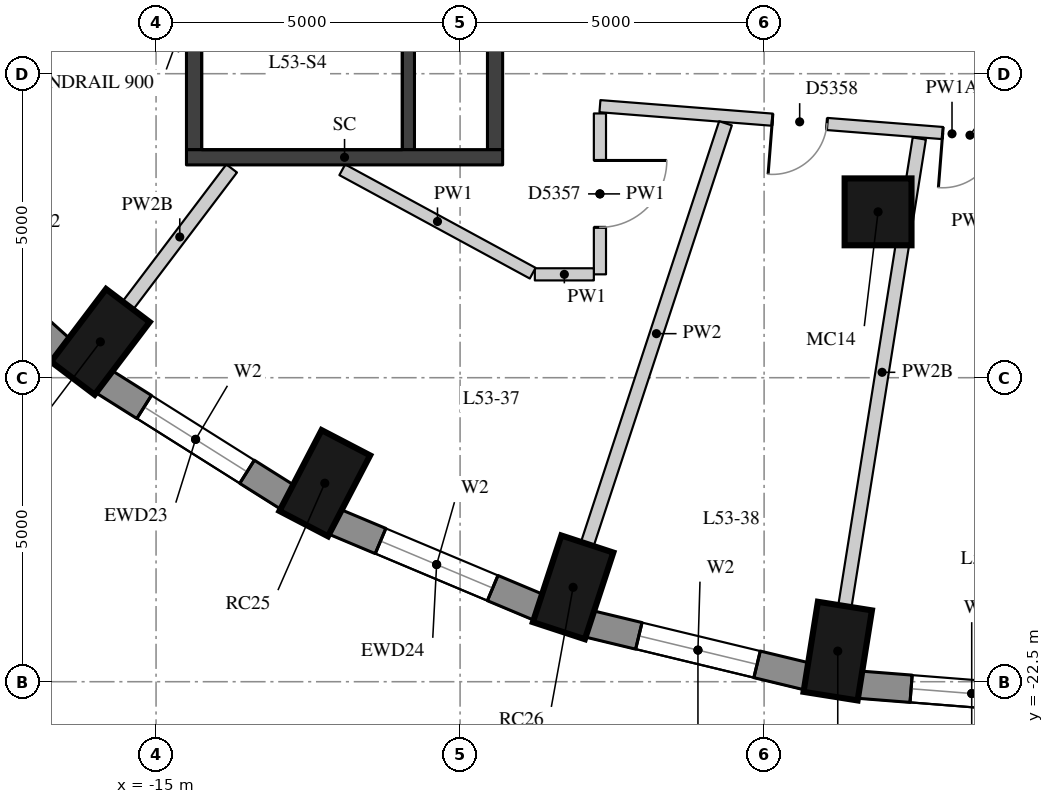
"""IFC4 building model, lengths in metres.
Left out: names, types, materials, properties, quantities, classifications, styles, units other than length and angle.
Written with IfcOpenShell. Run it as: python <this file> out.ifc"""

import sys

from ifc_helpers import new_model, si_unit, direction, frame, frame_2d, origin, origin_2d, place, context, subcontext, project, spatial, rectangle, extrude, element, fill, save


model = new_model("IFC4")
c1 = context("Model", 3, precision=1e-05, world=origin(), true_north=direction((0.0, 1.0)))
c2 = subcontext(c1, "Body", "Model", "MODEL_VIEW")
j1 = project(units=[si_unit("LENGTHUNIT", "METRE"), si_unit("PLANEANGLEUNIT", "RADIAN")], contexts=[c1])
p1 = place(None, origin())
s1 = spatial("IfcSite", under=j1, at=p1, CompositionType="ELEMENT")
p2 = place(p1, origin())
s2 = spatial("IfcBuilding", under=s1, at=p2, CompositionType="ELEMENT")
p3 = place(p2, frame((0.0, 0.0, 189.2)))
s3 = spatial("IfcBuildingStorey", under=s2, at=p3, CompositionType="ELEMENT", Elevation=189.2)
for number, where, z_axis, x_axis in (
    (1, (-15.916, -16.911, 0.0), (0.0, 0.0, 1.0), (-0.604, -0.797, 0.0)),
    (2, (-12.225, -19.235, 0.0), (0.0, 0.0, 1.0), (-0.462, -0.887, 0.0)),
    (3, (-8.141, -20.948, 0.0), (0.0, 0.0, 1.0), (-0.312, -0.95, 0.0)),
    (4, (-3.789, -21.997, 0.0), (0.0, 0.0, 1.0), (-0.157, -0.988, 0.0)),
):
    element("IfcColumn", number, at=place(p3, frame(where, z_axis=z_axis, x_axis=x_axis)), inside=s3, PredefinedType="COLUMN", context=c2, shape_type="SweptSolid", body=[
        extrude(rectangle(XDim=1.5, YDim=0.9, at=origin_2d()), origin(), (0.0, 0.0, 1.0), 3.3),
    ])
p4 = place(p3, frame((-3.126, -14.772, 0.0), z_axis=(0.0, 0.0, 1.0), x_axis=(1.0, 0.0, 0.0)))
e5 = element("IfcColumn", 5, at=p4, inside=s3, PredefinedType="COLUMN", context=c2, shape_type="SweptSolid", body=[
    extrude(rectangle(XDim=1.1, YDim=1.1, at=origin_2d()), origin(), (0.0, 0.0, 1.0), 3.3),
])
p5 = place(p3, frame((-19.165, -14.69, 0.0), z_axis=(0.0, 0.0, 1.0), x_axis=(0.743442727602, -0.668799604348, 0.0)))
e6 = element("IfcWall", 6, at=p5, inside=s3, PredefinedType="SOLIDWALL", context=c2, shape_type="SweptSolid", body=[
    extrude(rectangle(XDim=3.513, YDim=0.45, at=frame_2d((1.756, 0.0))), origin(), (0.0, 0.0, 1.0), 3.02),
])
p6 = place(p5, frame((0.756, 0.0, 0.4)))
e7 = element("IfcOpeningElement", 7, at=p6, cuts=e6, PredefinedType="OPENING", context=c2, shape_type="SweptSolid", body=[
    extrude(rectangle(XDim=2.0, YDim=1.75, at=frame_2d((1.0, 0.875))), frame((0.0, 0.235, 0.0), z_axis=(0.0, -1.0, 0.0), x_axis=(1.0, 0.0, 0.0)), (0.0, 0.0, 1.0), 0.47),
])
p7 = place(p3, frame((-15.867, -17.559, 0.0), z_axis=(0.0, 0.0, 1.0), x_axis=(0.84616917791, -0.532914366813, 0.0)))
e8 = element("IfcWall", 8, at=p7, inside=s3, PredefinedType="SOLIDWALL", context=c2, shape_type="SweptSolid", body=[
    extrude(rectangle(XDim=3.587, YDim=0.45, at=frame_2d((1.793, 0.0))), origin(), (0.0, 0.0, 1.0), 3.02),
])
p8 = place(p7, frame((0.793, 0.0, 0.4)))
e9 = element("IfcOpeningElement", 9, at=p8, cuts=e8, PredefinedType="OPENING", context=c2, shape_type="SweptSolid", body=[
    extrude(rectangle(XDim=2.0, YDim=1.75, at=frame_2d((1.0, 0.875))), frame((0.0, 0.235, 0.0), z_axis=(0.0, -1.0, 0.0), x_axis=(1.0, 0.0, 0.0)), (0.0, 0.0, 1.0), 0.47),
])
p9 = place(p3, frame((-12.069, -19.867, 0.0), z_axis=(0.0, 0.0, 1.0), x_axis=(0.922168222612, -0.386789050006, 0.0)))
e10 = element("IfcWall", 10, at=p9, inside=s3, PredefinedType="SOLIDWALL", context=c2, shape_type="SweptSolid", body=[
    extrude(rectangle(XDim=3.651, YDim=0.45, at=frame_2d((1.825, 0.0))), origin(), (0.0, 0.0, 1.0), 3.02),
])
p10 = place(p9, frame((0.825, 0.0, 0.4)))
e11 = element("IfcOpeningElement", 11, at=p10, cuts=e10, PredefinedType="OPENING", context=c2, shape_type="SweptSolid", body=[
    extrude(rectangle(XDim=2.0, YDim=1.75, at=frame_2d((1.0, 0.875))), frame((0.0, 0.235, 0.0), z_axis=(0.0, -1.0, 0.0), x_axis=(1.0, 0.0, 0.0)), (0.0, 0.0, 1.0), 0.47),
])
p11 = place(p3, frame((-7.885, -21.547, 0.0), z_axis=(0.0, 0.0, 1.0), x_axis=(0.9721584944, -0.234324266275, 0.0)))
e12 = element("IfcWall", 12, at=p11, inside=s3, PredefinedType="SOLIDWALL", context=c2, shape_type="SweptSolid", body=[
    extrude(rectangle(XDim=3.698, YDim=0.45, at=frame_2d((1.849, 0.0))), origin(), (0.0, 0.0, 1.0), 3.02),
])
p12 = place(p11, frame((0.849, 0.0, 0.4)))
e13 = element("IfcOpeningElement", 13, at=p12, cuts=e12, PredefinedType="OPENING", context=c2, shape_type="SweptSolid", body=[
    extrude(rectangle(XDim=2.0, YDim=1.75, at=frame_2d((1.0, 0.875))), frame((0.0, 0.235, 0.0), z_axis=(0.0, -1.0, 0.0), x_axis=(1.0, 0.0, 0.0)), (0.0, 0.0, 1.0), 0.47),
])
p13 = place(p3, frame((-3.441, -22.548, 0.0), z_axis=(0.0, 0.0, 1.0), x_axis=(0.996913971077, -0.078501810629, 0.0)))
e14 = element("IfcWall", 14, at=p13, inside=s3, PredefinedType="SOLIDWALL", context=c2, shape_type="SweptSolid", body=[
    extrude(rectangle(XDim=3.723, YDim=0.45, at=frame_2d((1.861, 0.0))), origin(), (0.0, 0.0, 1.0), 3.02),
])
p14 = place(p13, frame((0.861, 0.0, 0.4)))
e15 = element("IfcOpeningElement", 15, at=p14, cuts=e14, PredefinedType="OPENING", context=c2, shape_type="SweptSolid", body=[
    extrude(rectangle(XDim=2.0, YDim=1.75, at=frame_2d((1.0, 0.875))), frame((0.0, 0.235, 0.0), z_axis=(0.0, -1.0, 0.0), x_axis=(1.0, 0.0, 0.0)), (0.0, 0.0, 1.0), 0.47),
])
p15 = place(p3, frame((-10.85, -13.75, 0.0), z_axis=(0.0, 0.0, 1.0), x_axis=(0.0, 1.0, 0.0)))
e16 = element("IfcWall", 16, at=p15, inside=s3, PredefinedType="SHEAR", context=c2, shape_type="SweptSolid", body=[
    extrude(rectangle(XDim=6.0, YDim=0.2, at=frame_2d((3.0, 0.0))), origin(), (0.0, 0.0, 1.0), 3.02),
])
p16 = place(p15, frame((4.4, 0.0, 0.0)))
e17 = element("IfcOpeningElement", 17, at=p16, cuts=e16, PredefinedType="OPENING", context=c2, shape_type="SweptSolid", body=[
    extrude(rectangle(XDim=1.5, YDim=2.1, at=frame_2d((0.75, 1.05))), frame((0.0, 0.11, 0.0), z_axis=(0.0, -1.0, 0.0), x_axis=(1.0, 0.0, 0.0)), (0.0, 0.0, 1.0), 0.22),
])
p17 = place(p3, frame((-14.375, -13.75, -0.28), z_axis=(0.0, 0.0, 1.0), x_axis=(0.0, 1.0, 0.0)))
e18 = element("IfcWall", 18, at=p17, inside=s3, PredefinedType="SHEAR", context=c2, shape_type="SweptSolid", body=[
    extrude(rectangle(XDim=6.0, YDim=0.25, at=frame_2d((3.0, 0.0))), origin(), (0.0, 0.0, 1.0), 3.3),
])
p18 = place(p3, frame((-9.425, -13.75, -0.28), z_axis=(0.0, 0.0, 1.0), x_axis=(0.0, 1.0, 0.0)))
e19 = element("IfcWall", 19, at=p18, inside=s3, PredefinedType="SHEAR", context=c2, shape_type="SweptSolid", body=[
    extrude(rectangle(XDim=6.0, YDim=0.25, at=frame_2d((3.0, 0.0))), origin(), (0.0, 0.0, 1.0), 3.3),
])
p19 = place(p18, frame((2.4, 0.0, 0.28)))
e20 = element("IfcOpeningElement", 20, at=p19, cuts=e19, PredefinedType="OPENING", context=c2, shape_type="SweptSolid", body=[
    extrude(rectangle(XDim=1.5, YDim=2.1, at=frame_2d((0.75, 1.05))), frame((0.0, 0.135, 0.0), z_axis=(0.0, -1.0, 0.0), x_axis=(1.0, 0.0, 0.0)), (0.0, 0.0, 1.0), 0.27),
])
p20 = place(p3, frame((-14.5, -13.875, -0.28), z_axis=(0.0, 0.0, 1.0), x_axis=(1.0, 0.0, 0.0)))
e21 = element("IfcWall", 21, at=p20, inside=s3, PredefinedType="SHEAR", context=c2, shape_type="SweptSolid", body=[
    extrude(rectangle(XDim=5.2, YDim=0.25, at=frame_2d((2.6, 0.0))), origin(), (0.0, 0.0, 1.0), 3.3),
])
p21 = place(p3, frame((3.881, -13.943, 0.0), z_axis=(0.0, 0.0, 1.0), x_axis=(-0.996932335491, 0.078268246772, 0.0)))
e22 = element("IfcWall", 22, at=p21, inside=s3, PredefinedType="PARTITIONING", context=c2, shape_type="SweptSolid", body=[
    extrude(rectangle(XDim=11.616, YDim=0.2, at=frame_2d((5.808, 0.0))), origin(), (0.0, 0.0, 1.0), 2.57),
])
p22 = place(p21, frame((7.871, 0.0, 0.0)))
e23 = element("IfcOpeningElement", 23, at=p22, cuts=e22, PredefinedType="OPENING", context=c2, shape_type="SweptSolid", body=[
    extrude(rectangle(XDim=0.9, YDim=2.1, at=frame_2d((0.45, 1.05))), frame((0.0, 0.11, 0.0), z_axis=(0.0, -1.0, 0.0), x_axis=(1.0, 0.0, 0.0)), (0.0, 0.0, 1.0), 0.22),
])
p23 = place(p21, frame((5.062, 0.0, 0.0)))
e24 = element("IfcOpeningElement", 24, at=p23, cuts=e22, PredefinedType="OPENING", context=c2, shape_type="SweptSolid", body=[
    extrude(rectangle(XDim=0.9, YDim=2.1, at=frame_2d((0.45, 1.05))), frame((0.0, 0.11, 0.0), z_axis=(0.0, -1.0, 0.0), x_axis=(1.0, 0.0, 0.0)), (0.0, 0.0, 1.0), 0.22),
])
p24 = place(p21, frame((1.554, 0.0, 0.0)))
e25 = element("IfcOpeningElement", 25, at=p24, cuts=e22, PredefinedType="OPENING", context=c2, shape_type="SweptSolid", body=[
    extrude(rectangle(XDim=0.9, YDim=2.1, at=frame_2d((0.45, 1.05))), frame((0.0, 0.11, 0.0), z_axis=(0.0, -1.0, 0.0), x_axis=(1.0, 0.0, 0.0)), (0.0, 0.0, 1.0), 0.22),
])
p25 = place(p3, frame((-7.7, -13.154, 0.0), z_axis=(0.0, 0.0, 1.0), x_axis=(0.0, -1.0, 0.0)))
e26 = element("IfcWall", 26, at=p25, inside=s3, PredefinedType="PARTITIONING", context=c2, shape_type="SweptSolid", body=[
    extrude(rectangle(XDim=2.646, YDim=0.2, at=frame_2d((1.323, 0.0))), origin(), (0.0, 0.0, 1.0), 3.02),
])
p26 = place(p25, frame((0.773, 0.0, 0.0)))
e27 = element("IfcOpeningElement", 27, at=p26, cuts=e26, PredefinedType="OPENING", context=c2, shape_type="SweptSolid", body=[
    extrude(rectangle(XDim=1.1, YDim=2.1, at=frame_2d((0.55, 1.05))), frame((0.0, 0.11, 0.0), z_axis=(0.0, -1.0, 0.0), x_axis=(1.0, 0.0, 0.0)), (0.0, 0.0, 1.0), 0.22),
])
p27 = place(p3, frame((-7.8, -15.8, 0.0), z_axis=(0.0, 0.0, 1.0), x_axis=(-1.0, 0.0, 0.0)))
e28 = element("IfcWall", 28, at=p27, inside=s3, PredefinedType="PARTITIONING", context=c2, shape_type="SweptSolid", body=[
    extrude(rectangle(XDim=0.97, YDim=0.2, at=frame_2d((0.485, 0.0))), origin(), (0.0, 0.0, 1.0), 3.02),
])
p28 = place(p3, frame((-8.806, -15.781, 0.0), z_axis=(0.0, 0.0, 1.0), x_axis=(-0.878760680736, 0.477262680284, 0.0)))
e29 = element("IfcWall", 29, at=p28, inside=s3, PredefinedType="PARTITIONING", context=c2, shape_type="SweptSolid", body=[
    extrude(rectangle(XDim=3.564, YDim=0.2, at=frame_2d((1.782, 0.0))), origin(), (0.0, 0.0, 1.0), 3.02),
])
p29 = place(p3, frame((-15.463, -16.312, 0.0), z_axis=(0.0, 0.0, 1.0), x_axis=(0.603613294085, 0.797277236101, 0.0)))
e30 = element("IfcWall", 30, at=p29, inside=s3, PredefinedType="PARTITIONING", context=c2, shape_type="SweptSolid", body=[
    extrude(rectangle(XDim=2.828, YDim=0.22, at=frame_2d((1.414, 0.0))), origin(), (0.0, 0.0, 1.0), 2.57),
])
p30 = place(p3, frame((-7.907, -20.235, 0.0), z_axis=(0.0, 0.0, 1.0), x_axis=(0.311980831408, 0.950088396326, 0.0)))
e31 = element("IfcWall", 31, at=p30, inside=s3, PredefinedType="PARTITIONING", context=c2, shape_type="SweptSolid", body=[
    extrude(rectangle(XDim=7.283, YDim=0.22, at=frame_2d((3.642, 0.0))), origin(), (0.0, 0.0, 1.0), 3.02),
])
p31 = place(p3, frame((-3.671, -21.256, 0.0), z_axis=(0.0, 0.0, 1.0), x_axis=(0.157083078724, 0.987585391943, 0.0)))
e32 = element("IfcWall", 32, at=p31, inside=s3, PredefinedType="PARTITIONING", context=c2, shape_type="SweptSolid", body=[
    extrude(rectangle(XDim=7.787, YDim=0.22, at=frame_2d((3.893, 0.0))), origin(), (0.0, 0.0, 1.0), 2.57),
])
p32 = place(p8, origin())
e33 = element("IfcWindow", 33, at=p32, inside=s3, PartitioningType="SINGLE_PANEL", PredefinedType="WINDOW", context=c2, shape_type="SweptSolid", body=[
    extrude(rectangle(XDim=2.0, YDim=1.75, at=frame_2d((1.0, 0.875))), frame((0.0, 0.035, 0.0), z_axis=(0.0, -1.0, 0.0), x_axis=(1.0, 0.0, 0.0)), (0.0, 0.0, 1.0), 0.06),
])
fill(e9, e33)
p33 = place(p10, origin())
e34 = element("IfcWindow", 34, at=p33, inside=s3, PartitioningType="SINGLE_PANEL", PredefinedType="WINDOW", context=c2, shape_type="SweptSolid", body=[
    extrude(rectangle(XDim=2.0, YDim=1.75, at=frame_2d((1.0, 0.875))), frame((0.0, 0.035, 0.0), z_axis=(0.0, -1.0, 0.0), x_axis=(1.0, 0.0, 0.0)), (0.0, 0.0, 1.0), 0.06),
])
fill(e11, e34)
p34 = place(p12, origin())
e35 = element("IfcWindow", 35, at=p34, inside=s3, PartitioningType="SINGLE_PANEL", PredefinedType="WINDOW", context=c2, shape_type="SweptSolid", body=[
    extrude(rectangle(XDim=2.0, YDim=1.75, at=frame_2d((1.0, 0.875))), frame((0.0, 0.035, 0.0), z_axis=(0.0, -1.0, 0.0), x_axis=(1.0, 0.0, 0.0)), (0.0, 0.0, 1.0), 0.06),
])
fill(e13, e35)
p35 = place(p14, origin())
e36 = element("IfcWindow", 36, at=p35, inside=s3, PartitioningType="SINGLE_PANEL", PredefinedType="WINDOW", context=c2, shape_type="SweptSolid", body=[
    extrude(rectangle(XDim=2.0, YDim=1.75, at=frame_2d((1.0, 0.875))), frame((0.0, 0.035, 0.0), z_axis=(0.0, -1.0, 0.0), x_axis=(1.0, 0.0, 0.0)), (0.0, 0.0, 1.0), 0.06),
])
fill(e15, e36)
p36 = place(p26, origin())
e37 = element("IfcDoor", 37, at=p36, inside=s3, OperationType="SINGLE_SWING_LEFT", PredefinedType="DOOR", context=c2, shape_type="SweptSolid", body=[
    extrude(rectangle(XDim=1.1, YDim=2.1, at=frame_2d((0.55, 1.05))), frame((0.0, 0.025, 0.0), z_axis=(0.0, -1.0, 0.0), x_axis=(1.0, 0.0, 0.0)), (0.0, 0.0, 1.0), 0.05),
])
fill(e27, e37)
p37 = place(p22, origin())
e38 = element("IfcDoor", 38, at=p37, inside=s3, OperationType="SINGLE_SWING_RIGHT", PredefinedType="DOOR", context=c2, shape_type="SweptSolid", body=[
    extrude(rectangle(XDim=0.9, YDim=2.1, at=frame_2d((0.45, 1.05))), frame((0.0, 0.025, 0.0), z_axis=(0.0, -1.0, 0.0), x_axis=(1.0, 0.0, 0.0)), (0.0, 0.0, 1.0), 0.05),
])
fill(e23, e38)
p38 = place(p23, origin())
e39 = element("IfcDoor", 39, at=p38, inside=s3, OperationType="SINGLE_SWING_RIGHT", PredefinedType="DOOR", context=c2, shape_type="SweptSolid", body=[
    extrude(rectangle(XDim=0.9, YDim=2.1, at=frame_2d((0.45, 1.05))), frame((0.0, 0.025, 0.0), z_axis=(0.0, -1.0, 0.0), x_axis=(1.0, 0.0, 0.0)), (0.0, 0.0, 1.0), 0.05),
])
fill(e24, e39)
save(model, sys.argv[1])
